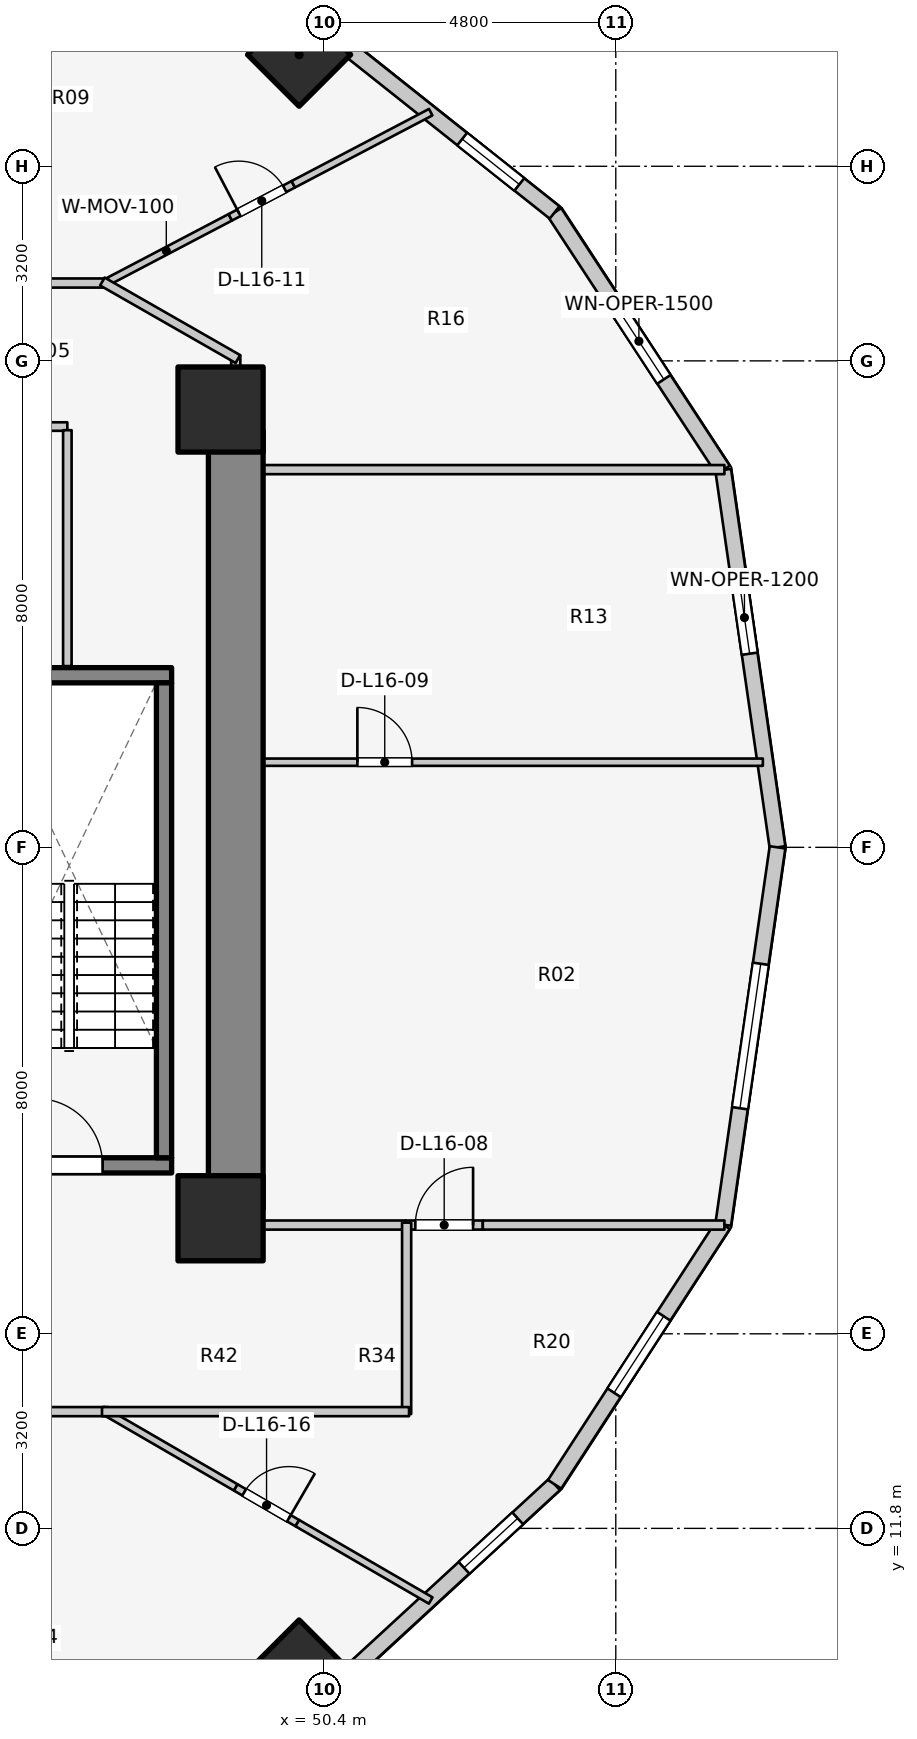
"""IFC4 building model, lengths in metres.
Left out: names, types, materials, properties, quantities, classifications, styles, units other than length and angle.
Written with IfcOpenShell. Run it as: python <this file> out.ifc"""

import sys

from ifc_helpers import new_model, si_unit, direction, frame, frame_2d, origin, origin_2d, place, context, subcontext, project, spatial, rectangle, extrude, element, fill, save


model = new_model("IFC4")
c1 = context("Model", 3, precision=1e-05, world=origin(), true_north=direction((0.0, 1.0)))
c2 = subcontext(c1, "Body", "Model", "MODEL_VIEW")
j1 = project(units=[si_unit("LENGTHUNIT", "METRE"), si_unit("PLANEANGLEUNIT", "RADIAN")], contexts=[c1])
p1 = place(None, origin())
s1 = spatial("IfcSite", under=j1, at=p1, CompositionType="ELEMENT")
p2 = place(p1, origin())
s2 = spatial("IfcBuilding", under=s1, at=p2, CompositionType="ELEMENT")
p3 = place(p2, frame((0.0, 0.0, 55.5)))
s3 = spatial("IfcBuildingStorey", under=s2, at=p3, CompositionType="ELEMENT", Elevation=55.5)
p4 = place(p3, frame((48.95, 17.05, 0.0), z_axis=(0.0, 0.0, 1.0), x_axis=(0.0, 1.0, 0.0)))
e1 = element("IfcWall", 1, at=p4, inside=s3, PredefinedType="SHEAR", context=c2, shape_type="SweptSolid", body=[
    extrude(rectangle(XDim=12.8, YDim=0.9, at=frame_2d((6.4, 0.0))), origin(), (0.0, 0.0, 1.0), 3.1),
])
p5 = place(p3, frame((44.525, 17.77, 0.0), z_axis=(0.0, 0.0, 1.0), x_axis=(1.0, 0.0, 0.0)))
e2 = element("IfcWall", 2, at=p5, inside=s3, PredefinedType="SOLIDWALL", context=c2, shape_type="SweptSolid", body=[
    extrude(rectangle(XDim=3.37, YDim=0.25, at=frame_2d((1.685, 0.0))), origin(), (0.0, 0.0, 1.0), 3.1),
])
p6 = place(p5, frame((1.135, 0.0, 0.0)))
e3 = element("IfcOpeningElement", 3, at=p6, cuts=e2, PredefinedType="OPENING", context=c2, shape_type="SweptSolid", body=[
    extrude(rectangle(XDim=1.1, YDim=2.1, at=frame_2d((0.55, 1.05))), frame((0.0, 0.135, 0.0), z_axis=(0.0, -1.0, 0.0), x_axis=(1.0, 0.0, 0.0)), (0.0, 0.0, 1.0), 0.27),
])
p7 = place(p3, frame((44.525, 25.83, 0.0), z_axis=(0.0, 0.0, 1.0), x_axis=(1.0, 0.0, 0.0)))
e4 = element("IfcWall", 4, at=p7, inside=s3, PredefinedType="SOLIDWALL", context=c2, shape_type="SweptSolid", body=[
    extrude(rectangle(XDim=3.37, YDim=0.25, at=frame_2d((1.685, 0.0))), origin(), (0.0, 0.0, 1.0), 3.1),
])
p8 = place(p3, frame((47.77, 17.895, 0.0), z_axis=(0.0, 0.0, 1.0), x_axis=(0.0, 1.0, 0.0)))
e5 = element("IfcWall", 5, at=p8, inside=s3, PredefinedType="SOLIDWALL", context=c2, shape_type="SweptSolid", body=[
    extrude(rectangle(XDim=7.81, YDim=0.25, at=frame_2d((3.905, 0.0))), origin(), (0.0, 0.0, 1.0), 3.1),
])
for number, where, z_axis, x_axis in (
    (6, (48.7, 16.9, 0.0), (0.0, 0.0, 1.0), (1.0, 0.0, 0.0)),
    (7, (48.7, 30.2, 0.0), (0.0, 0.0, 1.0), (1.0, 0.0, 0.0)),
):
    element("IfcColumn", number, at=place(p3, frame(where, z_axis=z_axis, x_axis=x_axis)), inside=s3, PredefinedType="COLUMN", context=c2, shape_type="SweptSolid", body=[
        extrude(rectangle(XDim=1.4, YDim=1.4, at=origin_2d()), origin(), (0.0, 0.0, 1.0), 3.1),
    ])
for number, where, z_axis, x_axis in (
    (8, (49.992, 36.035, 0.0), (0.0, 0.0, 1.0), (0.707, 0.707, 0.0)),
    (9, (49.992, 9.446, 0.0), (0.0, 0.0, 1.0), (0.707, -0.707, 0.0)),
):
    element("IfcColumn", number, at=place(p3, frame(where, z_axis=z_axis, x_axis=x_axis)), inside=s3, PredefinedType="COLUMN", context=c2, shape_type="SweptSolid", body=[
        extrude(rectangle(XDim=1.2, YDim=1.2, at=origin_2d()), origin(), (0.0, 0.0, 1.0), 3.1),
    ])
p9 = place(p3, frame((57.86, 23.0, 0.0), z_axis=(0.0, 0.0, 1.0), x_axis=(-0.142528001686, 0.989790770181, 0.0)))
e10 = element("IfcWall", 10, at=p9, inside=s3, PredefinedType="STANDARD", context=c2, shape_type="SweptSolid", body=[
    extrude(rectangle(XDim=6.269, YDim=0.26, at=frame_2d((3.135, 0.0))), origin(), (0.0, 0.0, 1.0), 2.85),
])
p10 = place(p9, frame((3.217, 0.0, 0.75)))
e11 = element("IfcOpeningElement", 11, at=p10, cuts=e10, PredefinedType="OPENING", context=c2, shape_type="SweptSolid", body=[
    extrude(rectangle(XDim=1.2, YDim=1.5, at=frame_2d((0.6, 0.75))), frame((0.0, 0.14, 0.0), z_axis=(0.0, -1.0, 0.0), x_axis=(1.0, 0.0, 0.0)), (0.0, 0.0, 1.0), 0.28),
])
p11 = place(p3, frame((56.967, 29.205, 0.0), z_axis=(0.0, 0.0, 1.0), x_axis=(-0.547702757047, 0.836672988642, 0.0)))
e12 = element("IfcWall", 12, at=p11, inside=s3, PredefinedType="STANDARD", context=c2, shape_type="SweptSolid", body=[
    extrude(rectangle(XDim=5.062, YDim=0.26, at=frame_2d((2.531, 0.0))), origin(), (0.0, 0.0, 1.0), 2.85),
])
p12 = place(p11, frame((1.781, 0.0, 0.75)))
e13 = element("IfcOpeningElement", 13, at=p12, cuts=e12, PredefinedType="OPENING", context=c2, shape_type="SweptSolid", body=[
    extrude(rectangle(XDim=1.5, YDim=1.6, at=frame_2d((0.75, 0.8))), frame((0.0, 0.14, 0.0), z_axis=(0.0, -1.0, 0.0), x_axis=(1.0, 0.0, 0.0)), (0.0, 0.0, 1.0), 0.28),
])
p13 = place(p3, frame((54.194, 33.441, 0.0), z_axis=(0.0, 0.0, 1.0), x_axis=(-0.783123133379, 0.621866672179, 0.0)))
e14 = element("IfcWall", 14, at=p13, inside=s3, PredefinedType="STANDARD", context=c2, shape_type="SweptSolid", body=[
    extrude(rectangle(XDim=4.839, YDim=0.26, at=frame_2d((2.419, 0.0))), origin(), (0.0, 0.0, 1.0), 2.85),
])
p14 = place(p13, frame((0.741, 0.0, 0.75)))
e15 = element("IfcOpeningElement", 15, at=p14, cuts=e14, PredefinedType="OPENING", context=c2, shape_type="SweptSolid", body=[
    extrude(rectangle(XDim=1.2, YDim=1.5, at=frame_2d((0.6, 0.75))), frame((0.0, 0.14, 0.0), z_axis=(0.0, -1.0, 0.0), x_axis=(1.0, 0.0, 0.0)), (0.0, 0.0, 1.0), 0.28),
])
p15 = place(p3, frame((50.405, 9.035, 0.0), z_axis=(0.0, 0.0, 1.0), x_axis=(0.735655109293, 0.67735630223, 0.0)))
e16 = element("IfcWall", 16, at=p15, inside=s3, PredefinedType="STANDARD", context=c2, shape_type="SweptSolid", body=[
    extrude(rectangle(XDim=5.151, YDim=0.26, at=frame_2d((2.575, 0.0))), origin(), (0.0, 0.0, 1.0), 2.85),
])
p16 = place(p15, frame((3.125, 0.0, 0.75)))
e17 = element("IfcOpeningElement", 17, at=p16, cuts=e16, PredefinedType="OPENING", context=c2, shape_type="SweptSolid", body=[
    extrude(rectangle(XDim=1.2, YDim=1.5, at=frame_2d((0.6, 0.75))), frame((0.0, 0.14, 0.0), z_axis=(0.0, -1.0, 0.0), x_axis=(1.0, 0.0, 0.0)), (0.0, 0.0, 1.0), 0.28),
])
p17 = place(p3, frame((54.194, 12.524, 0.0), z_axis=(0.0, 0.0, 1.0), x_axis=(0.544578722263, 0.838709732421, 0.0)))
e18 = element("IfcWall", 18, at=p17, inside=s3, PredefinedType="STANDARD", context=c2, shape_type="SweptSolid", body=[
    extrude(rectangle(XDim=5.092, YDim=0.26, at=frame_2d((2.546, 0.0))), origin(), (0.0, 0.0, 1.0), 2.85),
])
p18 = place(p17, frame((1.796, 0.0, 0.75)))
e19 = element("IfcOpeningElement", 19, at=p18, cuts=e18, PredefinedType="OPENING", context=c2, shape_type="SweptSolid", body=[
    extrude(rectangle(XDim=1.5, YDim=1.6, at=frame_2d((0.75, 0.8))), frame((0.0, 0.14, 0.0), z_axis=(0.0, -1.0, 0.0), x_axis=(1.0, 0.0, 0.0)), (0.0, 0.0, 1.0), 0.28),
])
p19 = place(p3, frame((56.967, 16.795, 0.0), z_axis=(0.0, 0.0, 1.0), x_axis=(0.142528001686, 0.989790770181, 0.0)))
e20 = element("IfcWall", 20, at=p19, inside=s3, PredefinedType="STANDARD", context=c2, shape_type="SweptSolid", body=[
    extrude(rectangle(XDim=6.269, YDim=0.26, at=frame_2d((3.135, 0.0))), origin(), (0.0, 0.0, 1.0), 2.85),
])
p20 = place(p19, frame((1.935, 0.0, 0.75)))
e21 = element("IfcOpeningElement", 21, at=p20, cuts=e20, PredefinedType="OPENING", context=c2, shape_type="SweptSolid", body=[
    extrude(rectangle(XDim=2.4, YDim=1.7, at=frame_2d((1.2, 0.85))), frame((0.0, 0.14, 0.0), z_axis=(0.0, -1.0, 0.0), x_axis=(1.0, 0.0, 0.0)), (0.0, 0.0, 1.0), 0.28),
])
p21 = place(p3, frame((44.58, 29.92, 0.0), z_axis=(0.0, 0.0, 1.0), x_axis=(1.0, 0.0, 0.0)))
e22 = element("IfcWall", 22, at=p21, inside=s3, PredefinedType="PLUMBINGWALL", context=c2, shape_type="SweptSolid", body=[
    extrude(rectangle(XDim=1.6, YDim=0.14, at=frame_2d((0.8, 0.0))), origin(), (0.0, 0.0, 1.0), 2.855),
])
p22 = place(p21, frame((0.35, 0.0, 0.0)))
e23 = element("IfcOpeningElement", 23, at=p22, cuts=e22, PredefinedType="OPENING", context=c2, shape_type="SweptSolid", body=[
    extrude(rectangle(XDim=0.85, YDim=2.05, at=frame_2d((0.425, 1.025))), frame((0.0, 0.08, 0.0), z_axis=(0.0, -1.0, 0.0), x_axis=(1.0, 0.0, 0.0)), (0.0, 0.0, 1.0), 0.16),
])
p23 = place(p3, frame((46.18, 25.98, 0.0), z_axis=(0.0, 0.0, 1.0), x_axis=(0.0, 1.0, 0.0)))
e24 = element("IfcWall", 24, at=p23, inside=s3, PredefinedType="PLUMBINGWALL", context=c2, shape_type="SweptSolid", body=[
    extrude(rectangle(XDim=3.88, YDim=0.14, at=frame_2d((1.94, 0.0))), origin(), (0.0, 0.0, 1.0), 2.855),
])
p24 = place(p3, frame((48.95, 16.788, 0.0), z_axis=(0.0, 0.0, 1.0), x_axis=(1.0, 0.0, 0.0)))
e25 = element("IfcWall", 25, at=p24, inside=s3, PredefinedType="PARTITIONING", context=c2, shape_type="SweptSolid", body=[
    extrude(rectangle(XDim=2.793, YDim=0.15, at=frame_2d((1.396, 0.0))), origin(), (0.0, 0.0, 1.0), 2.069),
])
p25 = place(p3, frame((51.743, 16.788, 0.0), z_axis=(0.0, 0.0, 1.0), x_axis=(1.0, 0.0, 0.0)))
e26 = element("IfcWall", 26, at=p25, inside=s3, PredefinedType="PARTITIONING", context=c2, shape_type="SweptSolid", body=[
    extrude(rectangle(XDim=1.27, YDim=0.15, at=frame_2d((0.635, 0.0))), origin(), (0.0, 0.0, 1.0), 2.855),
])
p26 = place(p25, frame((0.16, 0.0, 0.0)))
e27 = element("IfcOpeningElement", 27, at=p26, cuts=e26, PredefinedType="OPENING", context=c2, shape_type="SweptSolid", body=[
    extrude(rectangle(XDim=0.95, YDim=2.1, at=frame_2d((0.475, 1.05))), frame((0.0, 0.085, 0.0), z_axis=(0.0, -1.0, 0.0), x_axis=(1.0, 0.0, 0.0)), (0.0, 0.0, 1.0), 0.17),
])
p27 = place(p3, frame((53.013, 16.788, 0.0), z_axis=(0.0, 0.0, 1.0), x_axis=(1.0, 0.0, 0.0)))
e28 = element("IfcWall", 28, at=p27, inside=s3, PredefinedType="PARTITIONING", context=c2, shape_type="SweptSolid", body=[
    extrude(rectangle(XDim=3.973, YDim=0.15, at=frame_2d((1.987, 0.0))), origin(), (0.0, 0.0, 1.0), 2.855),
])
p28 = place(p3, frame((48.95, 29.212, 0.0), z_axis=(0.0, 0.0, 1.0), x_axis=(1.0, 0.0, 0.0)))
e29 = element("IfcWall", 29, at=p28, inside=s3, PredefinedType="PARTITIONING", context=c2, shape_type="SweptSolid", body=[
    extrude(rectangle(XDim=8.036, YDim=0.15, at=frame_2d((4.018, 0.0))), origin(), (0.0, 0.0, 1.0), 2.855),
])
p29 = place(p3, frame((48.95, 24.4, 0.0), z_axis=(0.0, 0.0, 1.0), x_axis=(1.0, 0.0, 0.0)))
e30 = element("IfcWall", 30, at=p29, inside=s3, PredefinedType="MOVABLE", context=c2, shape_type="SweptSolid", body=[
    extrude(rectangle(XDim=8.669, YDim=0.12, at=frame_2d((4.334, 0.0))), origin(), (0.0, 0.0, 1.0), 2.855),
])
p30 = place(p29, frame((2.0, 0.0, 0.0)))
e31 = element("IfcOpeningElement", 31, at=p30, cuts=e30, PredefinedType="OPENING", context=c2, shape_type="SweptSolid", body=[
    extrude(rectangle(XDim=0.9, YDim=2.1, at=frame_2d((0.45, 1.05))), frame((0.0, 0.07, 0.0), z_axis=(0.0, -1.0, 0.0), x_axis=(1.0, 0.0, 0.0)), (0.0, 0.0, 1.0), 0.14),
])
p31 = place(p3, frame((48.95, 29.8, 0.0), z_axis=(0.0, 0.0, 1.0), x_axis=(0.0, 1.0, 0.0)))
e32 = element("IfcWall", 32, at=p31, inside=s3, PredefinedType="PARTITIONING", context=c2, shape_type="SweptSolid", body=[
    extrude(rectangle(XDim=1.29, YDim=0.15, at=frame_2d((0.645, 0.0))), origin(), (0.0, 0.0, 1.0), 2.069),
])
p32 = place(p3, frame((46.756, 32.257, 0.0), z_axis=(0.0, 0.0, 1.0), x_axis=(0.885586030676, 0.464475383924, 0.0)))
e33 = element("IfcWall", 33, at=p32, inside=s3, PredefinedType="MOVABLE", context=c2, shape_type="SweptSolid", body=[
    extrude(rectangle(XDim=2.376, YDim=0.12, at=frame_2d((1.188, 0.0))), origin(), (0.0, 0.0, 1.0), 2.855),
])
p33 = place(p3, frame((48.86, 33.36, 0.0), z_axis=(0.0, 0.0, 1.0), x_axis=(0.885447282698, 0.464739829972, 0.0)))
e34 = element("IfcWall", 34, at=p33, inside=s3, PredefinedType="MOVABLE", context=c2, shape_type="SweptSolid", body=[
    extrude(rectangle(XDim=1.17, YDim=0.12, at=frame_2d((0.585, 0.0))), origin(), (0.0, 0.0, 1.0), 2.11),
])
p34 = place(p33, frame((0.16, 0.0, 0.0)))
e35 = element("IfcOpeningElement", 35, at=p34, cuts=e34, PredefinedType="OPENING", context=c2, shape_type="SweptSolid", body=[
    extrude(rectangle(XDim=0.85, YDim=2.05, at=frame_2d((0.425, 1.025))), frame((0.0, 0.07, 0.0), z_axis=(0.0, -1.0, 0.0), x_axis=(1.0, 0.0, 0.0)), (0.0, 0.0, 1.0), 0.14),
])
p35 = place(p3, frame((49.896, 33.904, 0.0), z_axis=(0.0, 0.0, 1.0), x_axis=(0.885573027611, 0.464500175208, 0.0)))
e36 = element("IfcWall", 36, at=p35, inside=s3, PredefinedType="MOVABLE", context=c2, shape_type="SweptSolid", body=[
    extrude(rectangle(XDim=2.552, YDim=0.12, at=frame_2d((1.276, 0.0))), origin(), (0.0, 0.0, 1.0), 2.855),
])
p36 = place(p3, frame((39.33, 32.28, 0.0), z_axis=(0.0, 0.0, 1.0), x_axis=(1.0, 0.0, 0.0)))
e37 = element("IfcWall", 37, at=p36, inside=s3, PredefinedType="PARTITIONING", context=c2, shape_type="SweptSolid", body=[
    extrude(rectangle(XDim=7.52, YDim=0.15, at=frame_2d((3.76, 0.0))), origin(), (0.0, 0.0, 1.0), 2.237),
])
p37 = place(p36, frame((5.22, 0.0, 0.0)))
e38 = element("IfcOpeningElement", 38, at=p37, cuts=e37, PredefinedType="OPENING", context=c2, shape_type="SweptSolid", body=[
    extrude(rectangle(XDim=0.9, YDim=2.1, at=frame_2d((0.45, 1.05))), frame((0.0, 0.085, 0.0), z_axis=(0.0, -1.0, 0.0), x_axis=(1.0, 0.0, 0.0)), (0.0, 0.0, 1.0), 0.17),
])
p38 = place(p3, frame((46.757, 32.305, 0.0), z_axis=(0.0, 0.0, 1.0), x_axis=(0.867991349648, -0.496579315857, 0.0)))
e39 = element("IfcWall", 39, at=p38, inside=s3, PredefinedType="PARTITIONING", context=c2, shape_type="SweptSolid", body=[
    extrude(rectangle(XDim=2.567, YDim=0.15, at=frame_2d((1.283, 0.0))), origin(), (0.0, 0.0, 1.0), 2.069),
])
p39 = place(p3, frame((51.76, 13.68, 0.0), z_axis=(0.0, 0.0, 1.0), x_axis=(0.0, 1.0, 0.0)))
e40 = element("IfcWall", 40, at=p39, inside=s3, PredefinedType="PARTITIONING", context=c2, shape_type="SweptSolid", body=[
    extrude(rectangle(XDim=3.148, YDim=0.15, at=frame_2d((1.574, 0.0))), origin(), (0.0, 0.0, 1.0), 2.855),
])
p40 = place(p3, frame((46.757, 13.745, 0.0), z_axis=(0.0, 0.0, 1.0), x_axis=(0.865085506202, -0.501624428193, 0.0)))
e41 = element("IfcWall", 41, at=p40, inside=s3, PredefinedType="MOVABLE", context=c2, shape_type="SweptSolid", body=[
    extrude(rectangle(XDim=2.536, YDim=0.12, at=frame_2d((1.268, 0.0))), origin(), (0.0, 0.0, 1.0), 2.855),
])
p41 = place(p3, frame((48.95, 12.473, 0.0), z_axis=(0.0, 0.0, 1.0), x_axis=(0.865092761915, -0.501611915013, 0.0)))
e42 = element("IfcWall", 42, at=p41, inside=s3, PredefinedType="MOVABLE", context=c2, shape_type="SweptSolid", body=[
    extrude(rectangle(XDim=1.17, YDim=0.12, at=frame_2d((0.585, 0.0))), origin(), (0.0, 0.0, 1.0), 2.11),
])
p42 = place(p41, frame((0.16, 0.0, 0.0)))
e43 = element("IfcOpeningElement", 43, at=p42, cuts=e42, PredefinedType="OPENING", context=c2, shape_type="SweptSolid", body=[
    extrude(rectangle(XDim=0.85, YDim=2.05, at=frame_2d((0.425, 1.025))), frame((0.0, 0.07, 0.0), z_axis=(0.0, -1.0, 0.0), x_axis=(1.0, 0.0, 0.0)), (0.0, 0.0, 1.0), 0.14),
])
p43 = place(p3, frame((49.962, 11.886, 0.0), z_axis=(0.0, 0.0, 1.0), x_axis=(0.865085506202, -0.501624428193, 0.0)))
e44 = element("IfcWall", 44, at=p43, inside=s3, PredefinedType="MOVABLE", context=c2, shape_type="SweptSolid", body=[
    extrude(rectangle(XDim=2.536, YDim=0.12, at=frame_2d((1.268, 0.0))), origin(), (0.0, 0.0, 1.0), 2.855),
])
p44 = place(p3, frame((39.33, 13.72, 0.0), z_axis=(0.0, 0.0, 1.0), x_axis=(1.0, 0.0, 0.0)))
e45 = element("IfcWall", 45, at=p44, inside=s3, PredefinedType="PARTITIONING", context=c2, shape_type="SweptSolid", body=[
    extrude(rectangle(XDim=7.52, YDim=0.15, at=frame_2d((3.76, 0.0))), origin(), (0.0, 0.0, 1.0), 2.237),
])
p45 = place(p44, frame((5.22, 0.0, 0.0)))
e46 = element("IfcOpeningElement", 46, at=p45, cuts=e45, PredefinedType="OPENING", context=c2, shape_type="SweptSolid", body=[
    extrude(rectangle(XDim=0.9, YDim=2.1, at=frame_2d((0.45, 1.05))), frame((0.0, 0.085, 0.0), z_axis=(0.0, -1.0, 0.0), x_axis=(1.0, 0.0, 0.0)), (0.0, 0.0, 1.0), 0.17),
])
p46 = place(p3, frame((46.75, 13.72, 0.0), z_axis=(0.0, 0.0, 1.0), x_axis=(1.0, 0.0, 0.0)))
e47 = element("IfcWall", 47, at=p46, inside=s3, PredefinedType="PARTITIONING", context=c2, shape_type="SweptSolid", body=[
    extrude(rectangle(XDim=5.05, YDim=0.15, at=frame_2d((2.525, 0.0))), origin(), (0.0, 0.0, 1.0), 2.069),
])
p47 = place(p10, origin())
e48 = element("IfcWindow", 48, at=p47, inside=s3, PartitioningType="SINGLE_PANEL", PredefinedType="WINDOW", context=c2, shape_type="SweptSolid", body=[
    extrude(rectangle(XDim=1.2, YDim=1.5, at=frame_2d((0.6, 0.75))), frame((0.0, 0.03, 0.0), z_axis=(0.0, -1.0, 0.0), x_axis=(1.0, 0.0, 0.0)), (0.0, 0.0, 1.0), 0.06),
])
fill(e11, e48)
p48 = place(p12, origin())
e49 = element("IfcWindow", 49, at=p48, inside=s3, PartitioningType="SINGLE_PANEL", PredefinedType="WINDOW", context=c2, shape_type="SweptSolid", body=[
    extrude(rectangle(XDim=1.5, YDim=1.6, at=frame_2d((0.75, 0.8))), frame((0.0, 0.03, 0.0), z_axis=(0.0, -1.0, 0.0), x_axis=(1.0, 0.0, 0.0)), (0.0, 0.0, 1.0), 0.06),
])
fill(e13, e49)
p49 = place(p14, origin())
e50 = element("IfcWindow", 50, at=p49, inside=s3, PartitioningType="SINGLE_PANEL", PredefinedType="WINDOW", context=c2, shape_type="SweptSolid", body=[
    extrude(rectangle(XDim=1.2, YDim=1.5, at=frame_2d((0.6, 0.75))), frame((0.0, 0.03, 0.0), z_axis=(0.0, -1.0, 0.0), x_axis=(1.0, 0.0, 0.0)), (0.0, 0.0, 1.0), 0.06),
])
fill(e15, e50)
p50 = place(p16, origin())
e51 = element("IfcWindow", 51, at=p50, inside=s3, PartitioningType="SINGLE_PANEL", PredefinedType="WINDOW", context=c2, shape_type="SweptSolid", body=[
    extrude(rectangle(XDim=1.2, YDim=1.5, at=frame_2d((0.6, 0.75))), frame((0.0, 0.03, 0.0), z_axis=(0.0, -1.0, 0.0), x_axis=(1.0, 0.0, 0.0)), (0.0, 0.0, 1.0), 0.06),
])
fill(e17, e51)
p51 = place(p18, origin())
e52 = element("IfcWindow", 52, at=p51, inside=s3, PartitioningType="SINGLE_PANEL", PredefinedType="WINDOW", context=c2, shape_type="SweptSolid", body=[
    extrude(rectangle(XDim=1.5, YDim=1.6, at=frame_2d((0.75, 0.8))), frame((0.0, 0.03, 0.0), z_axis=(0.0, -1.0, 0.0), x_axis=(1.0, 0.0, 0.0)), (0.0, 0.0, 1.0), 0.06),
])
fill(e19, e52)
p52 = place(p20, origin())
e53 = element("IfcWindow", 53, at=p52, inside=s3, PartitioningType="SINGLE_PANEL", PredefinedType="WINDOW", context=c2, shape_type="SweptSolid", body=[
    extrude(rectangle(XDim=2.4, YDim=1.7, at=frame_2d((1.2, 0.85))), frame((0.0, 0.03, 0.0), z_axis=(0.0, -1.0, 0.0), x_axis=(1.0, 0.0, 0.0)), (0.0, 0.0, 1.0), 0.06),
])
fill(e21, e53)
p53 = place(p6, origin())
e54 = element("IfcDoor", 54, at=p53, inside=s3, OperationType="SINGLE_SWING_LEFT", PredefinedType="DOOR", context=c2, shape_type="SweptSolid", body=[
    extrude(rectangle(XDim=1.1, YDim=2.1, at=frame_2d((0.55, 1.05))), frame((0.0, 0.025, 0.0), z_axis=(0.0, -1.0, 0.0), x_axis=(1.0, 0.0, 0.0)), (0.0, 0.0, 1.0), 0.05),
])
fill(e3, e54)
p54 = place(p26, origin())
e55 = element("IfcDoor", 55, at=p54, inside=s3, OperationType="SINGLE_SWING_RIGHT", PredefinedType="DOOR", context=c2, shape_type="SweptSolid", body=[
    extrude(rectangle(XDim=0.95, YDim=2.1, at=frame_2d((0.475, 1.05))), frame((0.0, 0.025, 0.0), z_axis=(0.0, -1.0, 0.0), x_axis=(1.0, 0.0, 0.0)), (0.0, 0.0, 1.0), 0.05),
])
fill(e27, e55)
p55 = place(p30, origin())
e56 = element("IfcDoor", 56, at=p55, inside=s3, OperationType="SINGLE_SWING_LEFT", PredefinedType="DOOR", context=c2, shape_type="SweptSolid", body=[
    extrude(rectangle(XDim=0.9, YDim=2.1, at=frame_2d((0.45, 1.05))), frame((0.0, 0.025, 0.0), z_axis=(0.0, -1.0, 0.0), x_axis=(1.0, 0.0, 0.0)), (0.0, 0.0, 1.0), 0.05),
])
fill(e31, e56)
p56 = place(p34, origin())
e57 = element("IfcDoor", 57, at=p56, inside=s3, OperationType="SINGLE_SWING_LEFT", PredefinedType="DOOR", context=c2, shape_type="SweptSolid", body=[
    extrude(rectangle(XDim=0.85, YDim=2.05, at=frame_2d((0.425, 1.025))), frame((0.0, 0.025, 0.0), z_axis=(0.0, -1.0, 0.0), x_axis=(1.0, 0.0, 0.0)), (0.0, 0.0, 1.0), 0.05),
])
fill(e35, e57)
p57 = place(p42, origin())
e58 = element("IfcDoor", 58, at=p57, inside=s3, OperationType="SINGLE_SWING_RIGHT", PredefinedType="DOOR", context=c2, shape_type="SweptSolid", body=[
    extrude(rectangle(XDim=0.85, YDim=2.05, at=frame_2d((0.425, 1.025))), frame((0.0, 0.025, 0.0), z_axis=(0.0, -1.0, 0.0), x_axis=(1.0, 0.0, 0.0)), (0.0, 0.0, 1.0), 0.05),
])
fill(e43, e58)
save(model, sys.argv[1])
